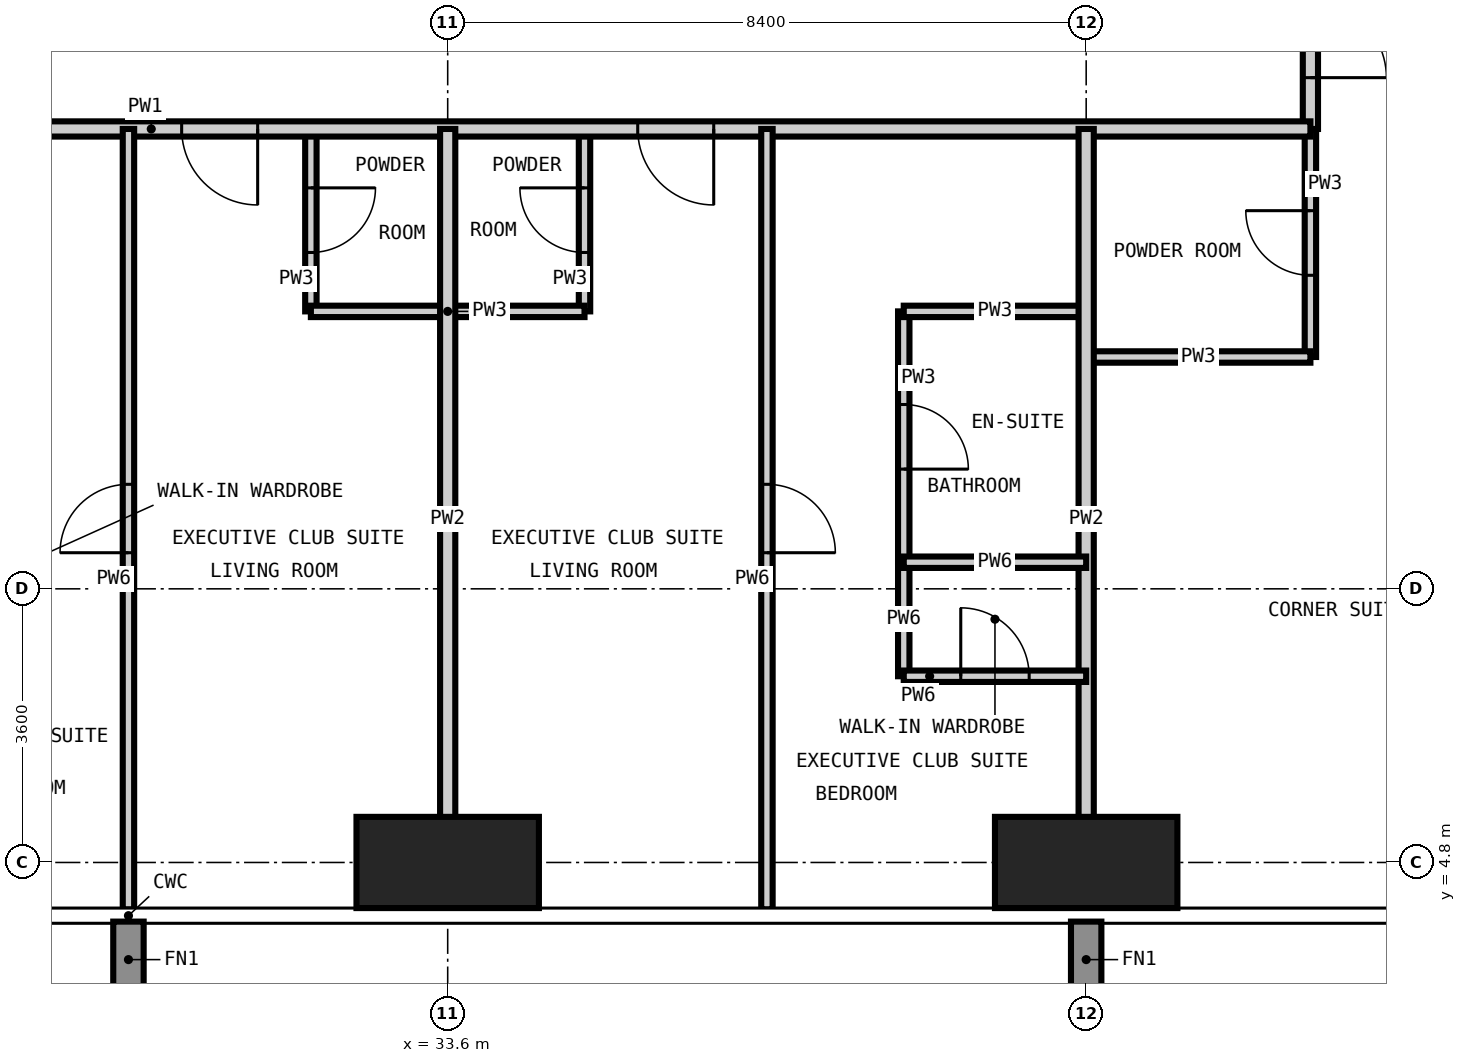
"""IFC4 building model, lengths in metres.
Left out: names, types, materials, properties, quantities, classifications, styles, units other than length and angle.
Written with IfcOpenShell. Run it as: python <this file> out.ifc"""

import sys

from ifc_helpers import new_model, si_unit, direction, frame, frame_2d, origin, origin_2d, place, context, subcontext, project, spatial, rectangle, extrude, element, fill, save


model = new_model("IFC4")
c1 = context("Model", 3, precision=1e-05, world=origin(), true_north=direction((0.0, 1.0)))
c2 = subcontext(c1, "Body", "Model", "MODEL_VIEW")
j1 = project(units=[si_unit("LENGTHUNIT", "METRE"), si_unit("PLANEANGLEUNIT", "RADIAN")], contexts=[c1])
p1 = place(None, origin())
s1 = spatial("IfcSite", under=j1, at=p1, CompositionType="ELEMENT")
p2 = place(p1, origin())
s2 = spatial("IfcBuilding", under=s1, at=p2, CompositionType="ELEMENT")
p3 = place(p2, frame((0.0, 0.0, 177.0)))
s3 = spatial("IfcBuildingStorey", under=s2, at=p3, CompositionType="ELEMENT", Elevation=177.0)
for number, where, z_axis, x_axis in (
    (1, (33.6, 4.8, -0.35), (0.0, 0.0, 1.0), (1.0, 0.0, 0.0)),
    (2, (42.0, 4.8, -0.35), (0.0, 0.0, 1.0), (1.0, 0.0, 0.0)),
):
    element("IfcColumn", number, at=place(p3, frame(where, z_axis=z_axis, x_axis=x_axis)), inside=s3, PredefinedType="COLUMN", context=c2, shape_type="SweptSolid", body=[
        extrude(rectangle(XDim=2.4, YDim=1.2, at=origin_2d()), origin(), (0.0, 0.0, 1.0), 3.6),
    ])
p4 = place(p3, frame((31.8, 12.05, 0.0), z_axis=(0.0, 0.0, 1.0), x_axis=(0.0, 1.0, 0.0)))
e3 = element("IfcWall", 3, at=p4, inside=s3, PredefinedType="PARTITIONING", context=c2, shape_type="SweptSolid", body=[
    extrude(rectangle(XDim=2.4, YDim=0.15, at=frame_2d((1.2, 0.0))), origin(), (0.0, 0.0, 1.0), 3.25),
])
p5 = place(p4, frame((0.775, 0.0, 0.0)))
e4 = element("IfcOpeningElement", 4, at=p5, cuts=e3, PredefinedType="OPENING", context=c2, shape_type="SweptSolid", body=[
    extrude(rectangle(XDim=0.85, YDim=2.1, at=frame_2d((0.425, 1.05))), frame((0.0, 0.085, 0.0), z_axis=(0.0, -1.0, 0.0), x_axis=(1.0, 0.0, 0.0)), (0.0, 0.0, 1.0), 0.17),
])
p6 = place(p3, frame((35.4, 12.05, 0.0), z_axis=(0.0, 0.0, 1.0), x_axis=(0.0, 1.0, 0.0)))
e5 = element("IfcWall", 5, at=p6, inside=s3, PredefinedType="PARTITIONING", context=c2, shape_type="SweptSolid", body=[
    extrude(rectangle(XDim=2.4, YDim=0.15, at=frame_2d((1.2, 0.0))), origin(), (0.0, 0.0, 1.0), 3.25),
])
p7 = place(p6, frame((0.775, 0.0, 0.0)))
e6 = element("IfcOpeningElement", 6, at=p7, cuts=e5, PredefinedType="OPENING", context=c2, shape_type="SweptSolid", body=[
    extrude(rectangle(XDim=0.85, YDim=2.1, at=frame_2d((0.425, 1.05))), frame((0.0, 0.085, 0.0), z_axis=(0.0, -1.0, 0.0), x_axis=(1.0, 0.0, 0.0)), (0.0, 0.0, 1.0), 0.17),
])
p8 = place(p3, frame((39.6, 8.75, 0.0), z_axis=(0.0, 0.0, 1.0), x_axis=(0.0, 1.0, 0.0)))
e7 = element("IfcWall", 7, at=p8, inside=s3, PredefinedType="PARTITIONING", context=c2, shape_type="SweptSolid", body=[
    extrude(rectangle(XDim=3.3, YDim=0.15, at=frame_2d((1.65, 0.0))), origin(), (0.0, 0.0, 1.0), 3.25),
])
p9 = place(p8, frame((1.225, 0.0, 0.0)))
e8 = element("IfcOpeningElement", 8, at=p9, cuts=e7, PredefinedType="OPENING", context=c2, shape_type="SweptSolid", body=[
    extrude(rectangle(XDim=0.85, YDim=2.1, at=frame_2d((0.425, 1.05))), frame((0.0, 0.085, 0.0), z_axis=(0.0, -1.0, 0.0), x_axis=(1.0, 0.0, 0.0)), (0.0, 0.0, 1.0), 0.17),
])
p10 = place(p3, frame((44.95, 11.45, 0.0), z_axis=(0.0, 0.0, 1.0), x_axis=(0.0, 1.0, 0.0)))
e9 = element("IfcWall", 9, at=p10, inside=s3, PredefinedType="PARTITIONING", context=c2, shape_type="SweptSolid", body=[
    extrude(rectangle(XDim=3.0, YDim=0.15, at=frame_2d((1.5, 0.0))), origin(), (0.0, 0.0, 1.0), 3.25),
])
p11 = place(p10, frame((1.075, 0.0, 0.0)))
e10 = element("IfcOpeningElement", 10, at=p11, cuts=e9, PredefinedType="OPENING", context=c2, shape_type="SweptSolid", body=[
    extrude(rectangle(XDim=0.85, YDim=2.1, at=frame_2d((0.425, 1.05))), frame((0.0, 0.085, 0.0), z_axis=(0.0, -1.0, 0.0), x_axis=(1.0, 0.0, 0.0)), (0.0, 0.0, 1.0), 0.17),
])
p12 = place(p3, frame((42.0, 11.45, 0.0), z_axis=(0.0, 0.0, 1.0), x_axis=(1.0, 0.0, 0.0)))
e11 = element("IfcWall", 11, at=p12, inside=s3, PredefinedType="PARTITIONING", context=c2, shape_type="SweptSolid", body=[
    extrude(rectangle(XDim=2.95, YDim=0.15, at=frame_2d((1.475, 0.0))), origin(), (0.0, 0.0, 1.0), 3.25),
])
p13 = place(p3, frame((31.8, 12.05, 0.0), z_axis=(0.0, 0.0, 1.0), x_axis=(1.0, 0.0, 0.0)))
e12 = element("IfcWall", 12, at=p13, inside=s3, PredefinedType="PARTITIONING", context=c2, shape_type="SweptSolid", body=[
    extrude(rectangle(XDim=3.6, YDim=0.15, at=frame_2d((1.8, 0.0))), origin(), (0.0, 0.0, 1.0), 3.25),
])
p14 = place(p3, frame((39.6, 12.05, 0.0), z_axis=(0.0, 0.0, 1.0), x_axis=(1.0, 0.0, 0.0)))
e13 = element("IfcWall", 13, at=p14, inside=s3, PredefinedType="PARTITIONING", context=c2, shape_type="SweptSolid", body=[
    extrude(rectangle(XDim=2.4, YDim=0.15, at=frame_2d((1.2, 0.0))), origin(), (0.0, 0.0, 1.0), 3.25),
])
p15 = place(p3, frame((44.95, 45.55, 0.0), z_axis=(0.0, 0.0, 1.0), x_axis=(0.0, -1.0, 0.0)))
e14 = element("IfcWall", 14, at=p15, inside=s3, PredefinedType="PARTITIONING", context=c2, shape_type="SweptSolid", body=[
    extrude(rectangle(XDim=31.1, YDim=0.2, at=frame_2d((15.55, 0.0))), origin(), (0.0, 0.0, 1.0), 3.25),
])
p16 = place(p15, frame((26.15, 0.0, 0.0)))
e15 = element("IfcOpeningElement", 15, at=p16, cuts=e14, PredefinedType="OPENING", context=c2, shape_type="SweptSolid", body=[
    extrude(rectangle(XDim=1.0, YDim=2.2, at=frame_2d((0.5, 1.1))), frame((0.0, 0.11, 0.0), z_axis=(0.0, -1.0, 0.0), x_axis=(1.0, 0.0, 0.0)), (0.0, 0.0, 1.0), 0.22),
])
p17 = place(p15, frame((21.95, 0.0, 0.0)))
e16 = element("IfcOpeningElement", 16, at=p17, cuts=e14, PredefinedType="OPENING", context=c2, shape_type="SweptSolid", body=[
    extrude(rectangle(XDim=1.0, YDim=2.2, at=frame_2d((0.5, 1.1))), frame((0.0, 0.11, 0.0), z_axis=(0.0, -1.0, 0.0), x_axis=(1.0, 0.0, 0.0)), (0.0, 0.0, 1.0), 0.22),
])
p18 = place(p15, frame((17.75, 0.0, 0.0)))
e17 = element("IfcOpeningElement", 17, at=p18, cuts=e14, PredefinedType="OPENING", context=c2, shape_type="SweptSolid", body=[
    extrude(rectangle(XDim=1.0, YDim=2.2, at=frame_2d((0.5, 1.1))), frame((0.0, 0.11, 0.0), z_axis=(0.0, -1.0, 0.0), x_axis=(1.0, 0.0, 0.0)), (0.0, 0.0, 1.0), 0.22),
])
p19 = place(p15, frame((13.55, 0.0, 0.0)))
e18 = element("IfcOpeningElement", 18, at=p19, cuts=e14, PredefinedType="OPENING", context=c2, shape_type="SweptSolid", body=[
    extrude(rectangle(XDim=1.0, YDim=2.2, at=frame_2d((0.5, 1.1))), frame((0.0, 0.11, 0.0), z_axis=(0.0, -1.0, 0.0), x_axis=(1.0, 0.0, 0.0)), (0.0, 0.0, 1.0), 0.22),
])
p20 = place(p15, frame((9.35, 0.0, 0.0)))
e19 = element("IfcOpeningElement", 19, at=p20, cuts=e14, PredefinedType="OPENING", context=c2, shape_type="SweptSolid", body=[
    extrude(rectangle(XDim=1.0, YDim=2.2, at=frame_2d((0.5, 1.1))), frame((0.0, 0.11, 0.0), z_axis=(0.0, -1.0, 0.0), x_axis=(1.0, 0.0, 0.0)), (0.0, 0.0, 1.0), 0.22),
])
p21 = place(p15, frame((5.15, 0.0, 0.0)))
e20 = element("IfcOpeningElement", 20, at=p21, cuts=e14, PredefinedType="OPENING", context=c2, shape_type="SweptSolid", body=[
    extrude(rectangle(XDim=1.0, YDim=2.2, at=frame_2d((0.5, 1.1))), frame((0.0, 0.11, 0.0), z_axis=(0.0, -1.0, 0.0), x_axis=(1.0, 0.0, 0.0)), (0.0, 0.0, 1.0), 0.22),
])
p22 = place(p15, frame((29.425, 0.0, 0.0)))
e21 = element("IfcOpeningElement", 21, at=p22, cuts=e14, PredefinedType="OPENING", context=c2, shape_type="SweptSolid", body=[
    extrude(rectangle(XDim=1.0, YDim=2.2, at=frame_2d((0.5, 1.1))), frame((0.0, 0.11, 0.0), z_axis=(0.0, -1.0, 0.0), x_axis=(1.0, 0.0, 0.0)), (0.0, 0.0, 1.0), 0.22),
])
p23 = place(p15, frame((1.275, 0.0, 0.0)))
e22 = element("IfcOpeningElement", 22, at=p23, cuts=e14, PredefinedType="OPENING", context=c2, shape_type="SweptSolid", body=[
    extrude(rectangle(XDim=1.0, YDim=2.2, at=frame_2d((0.5, 1.1))), frame((0.0, 0.11, 0.0), z_axis=(0.0, -1.0, 0.0), x_axis=(1.0, 0.0, 0.0)), (0.0, 0.0, 1.0), 0.22),
])
p24 = place(p3, frame((44.95, 14.45, 0.0), z_axis=(0.0, 0.0, 1.0), x_axis=(-1.0, 0.0, 0.0)))
e23 = element("IfcWall", 23, at=p24, inside=s3, PredefinedType="PARTITIONING", context=c2, shape_type="SweptSolid", body=[
    extrude(rectangle(XDim=30.5, YDim=0.2, at=frame_2d((15.25, 0.0))), origin(), (0.0, 0.0, 1.0), 3.25),
])
p25 = place(p24, frame((24.65, 0.0, 0.0)))
e24 = element("IfcOpeningElement", 24, at=p25, cuts=e23, PredefinedType="OPENING", context=c2, shape_type="SweptSolid", body=[
    extrude(rectangle(XDim=1.0, YDim=2.2, at=frame_2d((0.5, 1.1))), frame((0.0, 0.11, 0.0), z_axis=(0.0, -1.0, 0.0), x_axis=(1.0, 0.0, 0.0)), (0.0, 0.0, 1.0), 0.22),
])
p26 = place(p24, frame((13.85, 0.0, 0.0)))
e25 = element("IfcOpeningElement", 25, at=p26, cuts=e23, PredefinedType="OPENING", context=c2, shape_type="SweptSolid", body=[
    extrude(rectangle(XDim=1.0, YDim=2.2, at=frame_2d((0.5, 1.1))), frame((0.0, 0.11, 0.0), z_axis=(0.0, -1.0, 0.0), x_axis=(1.0, 0.0, 0.0)), (0.0, 0.0, 1.0), 0.22),
])
p27 = place(p24, frame((7.85, 0.0, 0.0)))
e26 = element("IfcOpeningElement", 26, at=p27, cuts=e23, PredefinedType="OPENING", context=c2, shape_type="SweptSolid", body=[
    extrude(rectangle(XDim=1.0, YDim=2.2, at=frame_2d((0.5, 1.1))), frame((0.0, 0.11, 0.0), z_axis=(0.0, -1.0, 0.0), x_axis=(1.0, 0.0, 0.0)), (0.0, 0.0, 1.0), 0.22),
])
for number, where, z_axis, x_axis in (
    (27, (33.6, 4.182, 0.0), (0.0, 0.0, 1.0), (0.0, 1.0, 0.0)),
    (28, (42.0, 4.182, 0.0), (0.0, 0.0, 1.0), (0.0, 1.0, 0.0)),
):
    element("IfcWall", number, at=place(p3, frame(where, z_axis=z_axis, x_axis=x_axis)), inside=s3, PredefinedType="PARTITIONING", context=c2, shape_type="SweptSolid", body=[
        extrude(rectangle(XDim=10.268, YDim=0.2, at=frame_2d((5.134, 0.0))), origin(), (0.0, 0.0, 1.0), 3.25),
    ])
p28 = place(p3, frame((29.4, 4.182, 0.0), z_axis=(0.0, 0.0, 1.0), x_axis=(0.0, 1.0, 0.0)))
e29 = element("IfcWall", 29, at=p28, inside=s3, PredefinedType="PARTITIONING", context=c2, shape_type="SweptSolid", body=[
    extrude(rectangle(XDim=10.268, YDim=0.15, at=frame_2d((5.134, 0.0))), origin(), (0.0, 0.0, 1.0), 3.25),
])
p29 = place(p28, frame((4.693, 0.0, 0.0)))
e30 = element("IfcOpeningElement", 30, at=p29, cuts=e29, PredefinedType="OPENING", context=c2, shape_type="SweptSolid", body=[
    extrude(rectangle(XDim=0.9, YDim=2.1, at=frame_2d((0.45, 1.05))), frame((0.0, 0.085, 0.0), z_axis=(0.0, -1.0, 0.0), x_axis=(1.0, 0.0, 0.0)), (0.0, 0.0, 1.0), 0.17),
])
p30 = place(p3, frame((37.8, 4.182, 0.0), z_axis=(0.0, 0.0, 1.0), x_axis=(0.0, 1.0, 0.0)))
e31 = element("IfcWall", 31, at=p30, inside=s3, PredefinedType="PARTITIONING", context=c2, shape_type="SweptSolid", body=[
    extrude(rectangle(XDim=10.268, YDim=0.15, at=frame_2d((5.134, 0.0))), origin(), (0.0, 0.0, 1.0), 3.25),
])
p31 = place(p30, frame((4.693, 0.0, 0.0)))
e32 = element("IfcOpeningElement", 32, at=p31, cuts=e31, PredefinedType="OPENING", context=c2, shape_type="SweptSolid", body=[
    extrude(rectangle(XDim=0.9, YDim=2.1, at=frame_2d((0.45, 1.05))), frame((0.0, 0.085, 0.0), z_axis=(0.0, -1.0, 0.0), x_axis=(1.0, 0.0, 0.0)), (0.0, 0.0, 1.0), 0.17),
])
p32 = place(p3, frame((39.6, 7.25, 0.0), z_axis=(0.0, 0.0, 1.0), x_axis=(0.0, 1.0, 0.0)))
e33 = element("IfcWall", 33, at=p32, inside=s3, PredefinedType="PARTITIONING", context=c2, shape_type="SweptSolid", body=[
    extrude(rectangle(XDim=1.5, YDim=0.15, at=frame_2d((0.75, 0.0))), origin(), (0.0, 0.0, 1.0), 3.25),
])
p33 = place(p3, frame((39.6, 7.25, 0.0), z_axis=(0.0, 0.0, 1.0), x_axis=(1.0, 0.0, 0.0)))
e34 = element("IfcWall", 34, at=p33, inside=s3, PredefinedType="PARTITIONING", context=c2, shape_type="SweptSolid", body=[
    extrude(rectangle(XDim=2.4, YDim=0.15, at=frame_2d((1.2, 0.0))), origin(), (0.0, 0.0, 1.0), 3.25),
])
p34 = place(p33, frame((0.75, 0.0, 0.0)))
e35 = element("IfcOpeningElement", 35, at=p34, cuts=e34, PredefinedType="OPENING", context=c2, shape_type="SweptSolid", body=[
    extrude(rectangle(XDim=0.9, YDim=2.1, at=frame_2d((0.45, 1.05))), frame((0.0, 0.085, 0.0), z_axis=(0.0, -1.0, 0.0), x_axis=(1.0, 0.0, 0.0)), (0.0, 0.0, 1.0), 0.17),
])
p35 = place(p3, frame((39.6, 8.75, 0.0), z_axis=(0.0, 0.0, 1.0), x_axis=(1.0, 0.0, 0.0)))
e36 = element("IfcWall", 36, at=p35, inside=s3, PredefinedType="PARTITIONING", context=c2, shape_type="SweptSolid", body=[
    extrude(rectangle(XDim=2.4, YDim=0.15, at=frame_2d((1.2, 0.0))), origin(), (0.0, 0.0, 1.0), 3.25),
])
p36 = place(p26, origin())
e37 = element("IfcDoor", 37, at=p36, inside=s3, OperationType="SINGLE_SWING_LEFT", PredefinedType="DOOR", context=c2, shape_type="SweptSolid", body=[
    extrude(rectangle(XDim=1.0, YDim=2.2, at=frame_2d((0.5, 1.1))), frame((0.0, 0.025, 0.0), z_axis=(0.0, -1.0, 0.0), x_axis=(1.0, 0.0, 0.0)), (0.0, 0.0, 1.0), 0.05),
])
fill(e25, e37)
p37 = place(p5, frame((0.85, 0.0, 0.0), z_axis=(0.0, 0.0, 1.0), x_axis=(-1.0, 0.0, 0.0)))
e38 = element("IfcDoor", 38, at=p37, inside=s3, OperationType="SINGLE_SWING_LEFT", PredefinedType="DOOR", context=c2, shape_type="SweptSolid", body=[
    extrude(rectangle(XDim=0.85, YDim=2.1, at=frame_2d((0.425, 1.05))), frame((0.0, 0.025, 0.0), z_axis=(0.0, -1.0, 0.0), x_axis=(1.0, 0.0, 0.0)), (0.0, 0.0, 1.0), 0.05),
])
fill(e4, e38)
p38 = place(p29, origin())
e39 = element("IfcDoor", 39, at=p38, inside=s3, OperationType="SINGLE_SWING_LEFT", PredefinedType="DOOR", context=c2, shape_type="SweptSolid", body=[
    extrude(rectangle(XDim=0.9, YDim=2.1, at=frame_2d((0.45, 1.05))), frame((0.0, 0.025, 0.0), z_axis=(0.0, -1.0, 0.0), x_axis=(1.0, 0.0, 0.0)), (0.0, 0.0, 1.0), 0.05),
])
fill(e30, e39)
p39 = place(p27, origin())
e40 = element("IfcDoor", 40, at=p39, inside=s3, OperationType="SINGLE_SWING_LEFT", PredefinedType="DOOR", context=c2, shape_type="SweptSolid", body=[
    extrude(rectangle(XDim=1.0, YDim=2.2, at=frame_2d((0.5, 1.1))), frame((0.0, 0.025, 0.0), z_axis=(0.0, -1.0, 0.0), x_axis=(1.0, 0.0, 0.0)), (0.0, 0.0, 1.0), 0.05),
])
fill(e26, e40)
p40 = place(p7, origin())
e41 = element("IfcDoor", 41, at=p40, inside=s3, OperationType="SINGLE_SWING_RIGHT", PredefinedType="DOOR", context=c2, shape_type="SweptSolid", body=[
    extrude(rectangle(XDim=0.85, YDim=2.1, at=frame_2d((0.425, 1.05))), frame((0.0, 0.025, 0.0), z_axis=(0.0, -1.0, 0.0), x_axis=(1.0, 0.0, 0.0)), (0.0, 0.0, 1.0), 0.05),
])
fill(e6, e41)
p41 = place(p31, frame((0.9, 0.0, 0.0), z_axis=(0.0, 0.0, 1.0), x_axis=(-1.0, 0.0, 0.0)))
e42 = element("IfcDoor", 42, at=p41, inside=s3, OperationType="SINGLE_SWING_RIGHT", PredefinedType="DOOR", context=c2, shape_type="SweptSolid", body=[
    extrude(rectangle(XDim=0.9, YDim=2.1, at=frame_2d((0.45, 1.05))), frame((0.0, 0.025, 0.0), z_axis=(0.0, -1.0, 0.0), x_axis=(1.0, 0.0, 0.0)), (0.0, 0.0, 1.0), 0.05),
])
fill(e32, e42)
p42 = place(p9, frame((0.85, 0.0, 0.0), z_axis=(0.0, 0.0, 1.0), x_axis=(-1.0, 0.0, 0.0)))
e43 = element("IfcDoor", 43, at=p42, inside=s3, OperationType="SINGLE_SWING_RIGHT", PredefinedType="DOOR", context=c2, shape_type="SweptSolid", body=[
    extrude(rectangle(XDim=0.85, YDim=2.1, at=frame_2d((0.425, 1.05))), frame((0.0, 0.025, 0.0), z_axis=(0.0, -1.0, 0.0), x_axis=(1.0, 0.0, 0.0)), (0.0, 0.0, 1.0), 0.05),
])
fill(e8, e43)
p43 = place(p34, origin())
e44 = element("IfcDoor", 44, at=p43, inside=s3, OperationType="SINGLE_SWING_LEFT", PredefinedType="DOOR", context=c2, shape_type="SweptSolid", body=[
    extrude(rectangle(XDim=0.9, YDim=2.1, at=frame_2d((0.45, 1.05))), frame((0.0, 0.025, 0.0), z_axis=(0.0, -1.0, 0.0), x_axis=(1.0, 0.0, 0.0)), (0.0, 0.0, 1.0), 0.05),
])
fill(e35, e44)
p44 = place(p22, origin())
e45 = element("IfcDoor", 45, at=p44, inside=s3, OperationType="SINGLE_SWING_RIGHT", PredefinedType="DOOR", context=c2, shape_type="SweptSolid", body=[
    extrude(rectangle(XDim=1.0, YDim=2.2, at=frame_2d((0.5, 1.1))), frame((0.0, 0.025, 0.0), z_axis=(0.0, -1.0, 0.0), x_axis=(1.0, 0.0, 0.0)), (0.0, 0.0, 1.0), 0.05),
])
fill(e21, e45)
p45 = place(p11, origin())
e46 = element("IfcDoor", 46, at=p45, inside=s3, OperationType="SINGLE_SWING_RIGHT", PredefinedType="DOOR", context=c2, shape_type="SweptSolid", body=[
    extrude(rectangle(XDim=0.85, YDim=2.1, at=frame_2d((0.425, 1.05))), frame((0.0, 0.025, 0.0), z_axis=(0.0, -1.0, 0.0), x_axis=(1.0, 0.0, 0.0)), (0.0, 0.0, 1.0), 0.05),
])
fill(e10, e46)
save(model, sys.argv[1])
